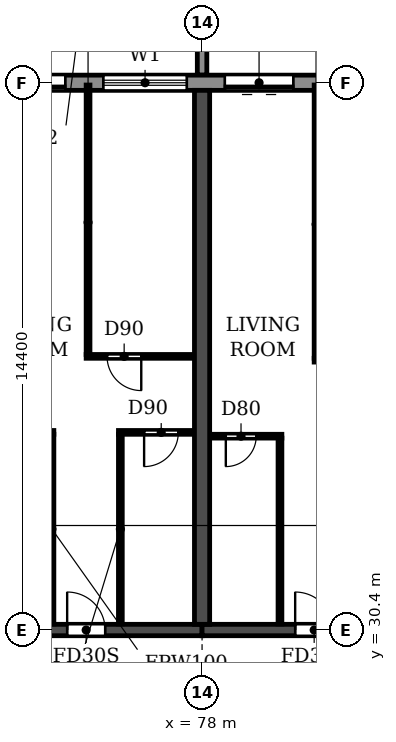
"""IFC4 building model, lengths in metres.
Left out: names, types, materials, properties, quantities, classifications, styles, units other than length and angle.
Written with IfcOpenShell. Run it as: python <this file> out.ifc"""

import sys

from ifc_helpers import new_model, si_unit, direction, frame, frame_2d, origin, place, context, subcontext, project, spatial, polyline, rectangle, outline, extrude, source, transform, mapped, element, fill, save


model = new_model("IFC4")
c1 = context("Model", 3, precision=1e-05, world=origin(), true_north=direction((0.0, 1.0)))
c2 = subcontext(c1, "Body", "Model", "MODEL_VIEW")
j1 = project(units=[si_unit("LENGTHUNIT", "METRE"), si_unit("PLANEANGLEUNIT", "RADIAN")], contexts=[c1])
p1 = place(None, origin())
s1 = spatial("IfcSite", under=j1, at=p1, CompositionType="ELEMENT")
p2 = place(p1, origin())
s2 = spatial("IfcBuilding", under=s1, at=p2, CompositionType="ELEMENT")
p3 = place(p2, frame((0.0, 0.0, 63.0)))
s3 = spatial("IfcBuildingStorey", under=s2, at=p3, CompositionType="ELEMENT", Elevation=63.0)
p4 = place(p3, frame((78.0, 30.55, 0.0), z_axis=(0.0, 0.0, 1.0), x_axis=(0.0, 1.0, 0.0)))
e1 = element("IfcWall", 1, at=p4, inside=s3, PredefinedType="SHEAR", context=c2, shape_type="SweptSolid", body=[
    extrude(rectangle(XDim=14.05, YDim=0.4, at=frame_2d((7.025, 0.0))), origin(), (0.0, 0.0, 1.0), 2.95),
])
p5 = place(p3, frame((72.0, 30.4, 0.0), z_axis=(0.0, 0.0, 1.0), x_axis=(1.0, 0.0, 0.0)))
e2 = element("IfcWall", 2, at=p5, inside=s3, PredefinedType="SHEAR", context=c2, shape_type="SweptSolid", body=[
    extrude(rectangle(XDim=6.0, YDim=0.3, at=frame_2d((3.0, 0.0))), origin(), (0.0, 0.0, 1.0), 2.35),
])
p6 = place(p5, frame((2.45, 0.0, 0.0)))
e3 = element("IfcOpeningElement", 3, at=p6, cuts=e2, PredefinedType="OPENING", context=c2, shape_type="SweptSolid", body=[
    extrude(rectangle(XDim=1.0, YDim=2.1, at=frame_2d((0.5, 1.05))), frame((0.0, 0.16, 0.0), z_axis=(0.0, -1.0, 0.0), x_axis=(1.0, 0.0, 0.0)), (0.0, 0.0, 1.0), 0.32),
])
p7 = place(p3, frame((78.0, 30.4, 0.0), z_axis=(0.0, 0.0, 1.0), x_axis=(1.0, 0.0, 0.0)))
e4 = element("IfcWall", 4, at=p7, inside=s3, PredefinedType="SHEAR", context=c2, shape_type="SweptSolid", body=[
    extrude(rectangle(XDim=6.0, YDim=0.3, at=frame_2d((3.0, 0.0))), origin(), (0.0, 0.0, 1.0), 2.35),
])
p8 = place(p7, frame((2.45, 0.0, 0.0)))
e5 = element("IfcOpeningElement", 5, at=p8, cuts=e4, PredefinedType="OPENING", context=c2, shape_type="SweptSolid", body=[
    extrude(rectangle(XDim=1.0, YDim=2.1, at=frame_2d((0.5, 1.05))), frame((0.0, 0.16, 0.0), z_axis=(0.0, -1.0, 0.0), x_axis=(1.0, 0.0, 0.0)), (0.0, 0.0, 1.0), 0.32),
])
p9 = place(p3, frame((91.317, 44.8, 0.0), z_axis=(0.0, 0.0, 1.0), x_axis=(-1.0, 0.0, 0.0)))
e6 = element("IfcWall", 6, at=p9, inside=s3, PredefinedType="STANDARD", context=c2, shape_type="SweptSolid", body=[
    extrude(rectangle(XDim=80.634, YDim=0.4, at=frame_2d((40.317, 0.0))), origin(), (0.0, 0.0, 1.0), 2.95),
])
p10 = place(p9, frame((76.717, 0.0, 0.9)))
e7 = element("IfcOpeningElement", 7, at=p10, cuts=e6, PredefinedType="OPENING", context=c2, shape_type="SweptSolid", body=[
    extrude(rectangle(XDim=2.2, YDim=1.5, at=frame_2d((1.1, 0.75))), frame((0.0, 0.21, 0.0), z_axis=(0.0, -1.0, 0.0), x_axis=(1.0, 0.0, 0.0)), (0.0, 0.0, 1.0), 0.42),
])
p11 = place(p9, frame((73.917, 0.0, 0.0)))
e8 = element("IfcOpeningElement", 8, at=p11, cuts=e6, PredefinedType="OPENING", context=c2, shape_type="SweptSolid", body=[
    extrude(rectangle(XDim=1.8, YDim=2.4, at=frame_2d((0.9, 1.2))), frame((0.0, 0.21, 0.0), z_axis=(0.0, -1.0, 0.0), x_axis=(1.0, 0.0, 0.0)), (0.0, 0.0, 1.0), 0.42),
])
p12 = place(p9, frame((70.717, 0.0, 0.9)))
e9 = element("IfcOpeningElement", 9, at=p12, cuts=e6, PredefinedType="OPENING", context=c2, shape_type="SweptSolid", body=[
    extrude(rectangle(XDim=2.2, YDim=1.5, at=frame_2d((1.1, 0.75))), frame((0.0, 0.21, 0.0), z_axis=(0.0, -1.0, 0.0), x_axis=(1.0, 0.0, 0.0)), (0.0, 0.0, 1.0), 0.42),
])
p13 = place(p9, frame((67.917, 0.0, 0.0)))
e10 = element("IfcOpeningElement", 10, at=p13, cuts=e6, PredefinedType="OPENING", context=c2, shape_type="SweptSolid", body=[
    extrude(rectangle(XDim=1.8, YDim=2.4, at=frame_2d((0.9, 1.2))), frame((0.0, 0.21, 0.0), z_axis=(0.0, -1.0, 0.0), x_axis=(1.0, 0.0, 0.0)), (0.0, 0.0, 1.0), 0.42),
])
p14 = place(p9, frame((64.717, 0.0, 0.9)))
e11 = element("IfcOpeningElement", 11, at=p14, cuts=e6, PredefinedType="OPENING", context=c2, shape_type="SweptSolid", body=[
    extrude(rectangle(XDim=2.2, YDim=1.5, at=frame_2d((1.1, 0.75))), frame((0.0, 0.21, 0.0), z_axis=(0.0, -1.0, 0.0), x_axis=(1.0, 0.0, 0.0)), (0.0, 0.0, 1.0), 0.42),
])
p15 = place(p9, frame((61.917, 0.0, 0.0)))
e12 = element("IfcOpeningElement", 12, at=p15, cuts=e6, PredefinedType="OPENING", context=c2, shape_type="SweptSolid", body=[
    extrude(rectangle(XDim=1.8, YDim=2.4, at=frame_2d((0.9, 1.2))), frame((0.0, 0.21, 0.0), z_axis=(0.0, -1.0, 0.0), x_axis=(1.0, 0.0, 0.0)), (0.0, 0.0, 1.0), 0.42),
])
p16 = place(p9, frame((58.717, 0.0, 0.9)))
e13 = element("IfcOpeningElement", 13, at=p16, cuts=e6, PredefinedType="OPENING", context=c2, shape_type="SweptSolid", body=[
    extrude(rectangle(XDim=2.2, YDim=1.5, at=frame_2d((1.1, 0.75))), frame((0.0, 0.21, 0.0), z_axis=(0.0, -1.0, 0.0), x_axis=(1.0, 0.0, 0.0)), (0.0, 0.0, 1.0), 0.42),
])
p17 = place(p9, frame((55.717, 0.0, 0.9)))
e14 = element("IfcOpeningElement", 14, at=p17, cuts=e6, PredefinedType="OPENING", context=c2, shape_type="SweptSolid", body=[
    extrude(rectangle(XDim=2.2, YDim=1.5, at=frame_2d((1.1, 0.75))), frame((0.0, 0.21, 0.0), z_axis=(0.0, -1.0, 0.0), x_axis=(1.0, 0.0, 0.0)), (0.0, 0.0, 1.0), 0.42),
])
p18 = place(p9, frame((52.917, 0.0, 0.0)))
e15 = element("IfcOpeningElement", 15, at=p18, cuts=e6, PredefinedType="OPENING", context=c2, shape_type="SweptSolid", body=[
    extrude(rectangle(XDim=1.8, YDim=2.4, at=frame_2d((0.9, 1.2))), frame((0.0, 0.21, 0.0), z_axis=(0.0, -1.0, 0.0), x_axis=(1.0, 0.0, 0.0)), (0.0, 0.0, 1.0), 0.42),
])
p19 = place(p9, frame((49.717, 0.0, 0.9)))
e16 = element("IfcOpeningElement", 16, at=p19, cuts=e6, PredefinedType="OPENING", context=c2, shape_type="SweptSolid", body=[
    extrude(rectangle(XDim=2.2, YDim=1.5, at=frame_2d((1.1, 0.75))), frame((0.0, 0.21, 0.0), z_axis=(0.0, -1.0, 0.0), x_axis=(1.0, 0.0, 0.0)), (0.0, 0.0, 1.0), 0.42),
])
p20 = place(p9, frame((46.917, 0.0, 0.0)))
e17 = element("IfcOpeningElement", 17, at=p20, cuts=e6, PredefinedType="OPENING", context=c2, shape_type="SweptSolid", body=[
    extrude(rectangle(XDim=1.8, YDim=2.4, at=frame_2d((0.9, 1.2))), frame((0.0, 0.21, 0.0), z_axis=(0.0, -1.0, 0.0), x_axis=(1.0, 0.0, 0.0)), (0.0, 0.0, 1.0), 0.42),
])
p21 = place(p9, frame((43.717, 0.0, 0.9)))
e18 = element("IfcOpeningElement", 18, at=p21, cuts=e6, PredefinedType="OPENING", context=c2, shape_type="SweptSolid", body=[
    extrude(rectangle(XDim=2.2, YDim=1.5, at=frame_2d((1.1, 0.75))), frame((0.0, 0.21, 0.0), z_axis=(0.0, -1.0, 0.0), x_axis=(1.0, 0.0, 0.0)), (0.0, 0.0, 1.0), 0.42),
])
p22 = place(p9, frame((40.717, 0.0, 0.9)))
e19 = element("IfcOpeningElement", 19, at=p22, cuts=e6, PredefinedType="OPENING", context=c2, shape_type="SweptSolid", body=[
    extrude(rectangle(XDim=2.2, YDim=1.5, at=frame_2d((1.1, 0.75))), frame((0.0, 0.21, 0.0), z_axis=(0.0, -1.0, 0.0), x_axis=(1.0, 0.0, 0.0)), (0.0, 0.0, 1.0), 0.42),
])
p23 = place(p9, frame((37.717, 0.0, 0.9)))
e20 = element("IfcOpeningElement", 20, at=p23, cuts=e6, PredefinedType="OPENING", context=c2, shape_type="SweptSolid", body=[
    extrude(rectangle(XDim=2.2, YDim=1.5, at=frame_2d((1.1, 0.75))), frame((0.0, 0.21, 0.0), z_axis=(0.0, -1.0, 0.0), x_axis=(1.0, 0.0, 0.0)), (0.0, 0.0, 1.0), 0.42),
])
p24 = place(p9, frame((34.717, 0.0, 0.9)))
e21 = element("IfcOpeningElement", 21, at=p24, cuts=e6, PredefinedType="OPENING", context=c2, shape_type="SweptSolid", body=[
    extrude(rectangle(XDim=2.2, YDim=1.5, at=frame_2d((1.1, 0.75))), frame((0.0, 0.21, 0.0), z_axis=(0.0, -1.0, 0.0), x_axis=(1.0, 0.0, 0.0)), (0.0, 0.0, 1.0), 0.42),
])
p25 = place(p9, frame((31.917, 0.0, 0.0)))
e22 = element("IfcOpeningElement", 22, at=p25, cuts=e6, PredefinedType="OPENING", context=c2, shape_type="SweptSolid", body=[
    extrude(rectangle(XDim=1.8, YDim=2.4, at=frame_2d((0.9, 1.2))), frame((0.0, 0.21, 0.0), z_axis=(0.0, -1.0, 0.0), x_axis=(1.0, 0.0, 0.0)), (0.0, 0.0, 1.0), 0.42),
])
p26 = place(p9, frame((28.917, 0.0, 0.0)))
e23 = element("IfcOpeningElement", 23, at=p26, cuts=e6, PredefinedType="OPENING", context=c2, shape_type="SweptSolid", body=[
    extrude(rectangle(XDim=1.8, YDim=2.4, at=frame_2d((0.9, 1.2))), frame((0.0, 0.21, 0.0), z_axis=(0.0, -1.0, 0.0), x_axis=(1.0, 0.0, 0.0)), (0.0, 0.0, 1.0), 0.42),
])
p27 = place(p9, frame((25.717, 0.0, 0.9)))
e24 = element("IfcOpeningElement", 24, at=p27, cuts=e6, PredefinedType="OPENING", context=c2, shape_type="SweptSolid", body=[
    extrude(rectangle(XDim=2.2, YDim=1.5, at=frame_2d((1.1, 0.75))), frame((0.0, 0.21, 0.0), z_axis=(0.0, -1.0, 0.0), x_axis=(1.0, 0.0, 0.0)), (0.0, 0.0, 1.0), 0.42),
])
p28 = place(p9, frame((22.917, 0.0, 0.0)))
e25 = element("IfcOpeningElement", 25, at=p28, cuts=e6, PredefinedType="OPENING", context=c2, shape_type="SweptSolid", body=[
    extrude(rectangle(XDim=1.8, YDim=2.4, at=frame_2d((0.9, 1.2))), frame((0.0, 0.21, 0.0), z_axis=(0.0, -1.0, 0.0), x_axis=(1.0, 0.0, 0.0)), (0.0, 0.0, 1.0), 0.42),
])
p29 = place(p9, frame((19.717, 0.0, 0.9)))
e26 = element("IfcOpeningElement", 26, at=p29, cuts=e6, PredefinedType="OPENING", context=c2, shape_type="SweptSolid", body=[
    extrude(rectangle(XDim=2.2, YDim=1.5, at=frame_2d((1.1, 0.75))), frame((0.0, 0.21, 0.0), z_axis=(0.0, -1.0, 0.0), x_axis=(1.0, 0.0, 0.0)), (0.0, 0.0, 1.0), 0.42),
])
p30 = place(p9, frame((16.917, 0.0, 0.0)))
e27 = element("IfcOpeningElement", 27, at=p30, cuts=e6, PredefinedType="OPENING", context=c2, shape_type="SweptSolid", body=[
    extrude(rectangle(XDim=1.8, YDim=2.4, at=frame_2d((0.9, 1.2))), frame((0.0, 0.21, 0.0), z_axis=(0.0, -1.0, 0.0), x_axis=(1.0, 0.0, 0.0)), (0.0, 0.0, 1.0), 0.42),
])
p31 = place(p9, frame((13.717, 0.0, 0.9)))
e28 = element("IfcOpeningElement", 28, at=p31, cuts=e6, PredefinedType="OPENING", context=c2, shape_type="SweptSolid", body=[
    extrude(rectangle(XDim=2.2, YDim=1.5, at=frame_2d((1.1, 0.75))), frame((0.0, 0.21, 0.0), z_axis=(0.0, -1.0, 0.0), x_axis=(1.0, 0.0, 0.0)), (0.0, 0.0, 1.0), 0.42),
])
p32 = place(p9, frame((10.917, 0.0, 0.0)))
e29 = element("IfcOpeningElement", 29, at=p32, cuts=e6, PredefinedType="OPENING", context=c2, shape_type="SweptSolid", body=[
    extrude(rectangle(XDim=1.8, YDim=2.4, at=frame_2d((0.9, 1.2))), frame((0.0, 0.21, 0.0), z_axis=(0.0, -1.0, 0.0), x_axis=(1.0, 0.0, 0.0)), (0.0, 0.0, 1.0), 0.42),
])
p33 = place(p9, frame((7.717, 0.0, 0.9)))
e30 = element("IfcOpeningElement", 30, at=p33, cuts=e6, PredefinedType="OPENING", context=c2, shape_type="SweptSolid", body=[
    extrude(rectangle(XDim=2.2, YDim=1.5, at=frame_2d((1.1, 0.75))), frame((0.0, 0.21, 0.0), z_axis=(0.0, -1.0, 0.0), x_axis=(1.0, 0.0, 0.0)), (0.0, 0.0, 1.0), 0.42),
])
p34 = place(p9, frame((4.717, 0.0, 0.9)))
e31 = element("IfcOpeningElement", 31, at=p34, cuts=e6, PredefinedType="OPENING", context=c2, shape_type="SweptSolid", body=[
    extrude(rectangle(XDim=2.2, YDim=1.5, at=frame_2d((1.1, 0.75))), frame((0.0, 0.21, 0.0), z_axis=(0.0, -1.0, 0.0), x_axis=(1.0, 0.0, 0.0)), (0.0, 0.0, 1.0), 0.42),
])
p35 = place(p9, frame((1.717, 0.0, 0.9)))
e32 = element("IfcOpeningElement", 32, at=p35, cuts=e6, PredefinedType="OPENING", context=c2, shape_type="SweptSolid", body=[
    extrude(rectangle(XDim=2.2, YDim=1.5, at=frame_2d((1.1, 0.75))), frame((0.0, 0.21, 0.0), z_axis=(0.0, -1.0, 0.0), x_axis=(1.0, 0.0, 0.0)), (0.0, 0.0, 1.0), 0.42),
])
m1 = source(origin(), c2, "Body", "SweptSolid", [
    extrude(outline(polyline([(0.0, 0.0), (0.25, 0.0), (0.25, 3.1), (0.0, 3.1), (0.0, 0.0)])), origin(), (0.0, 0.0, 1.0), 3.1),
])
p36 = place(p3, frame((77.875, 45.0, 0.0)))
e33 = element("IfcWall", 33, at=p36, inside=s3, PredefinedType="STANDARD", context=c2, shape_type="MappedRepresentation", body=[
    mapped(m1, transform((0.0, 0.0, 0.0))),
])
p37 = place(p3, frame((78.21, 35.5, 0.0), z_axis=(0.0, 0.0, 1.0), x_axis=(1.0, 0.0, 0.0)))
e34 = element("IfcWall", 34, at=p37, inside=s3, PredefinedType="PARTITIONING", context=c2, shape_type="SweptSolid", body=[
    extrude(rectangle(XDim=1.89, YDim=0.1, at=frame_2d((0.945, 0.0))), origin(), (0.0, 0.0, 1.0), 2.95),
])
p38 = place(p37, frame((0.415, 0.0, 0.0)))
e35 = element("IfcOpeningElement", 35, at=p38, cuts=e34, PredefinedType="OPENING", context=c2, shape_type="SweptSolid", body=[
    extrude(rectangle(XDim=0.8, YDim=2.1, at=frame_2d((0.4, 1.05))), frame((0.0, 0.06, 0.0), z_axis=(0.0, -1.0, 0.0), x_axis=(1.0, 0.0, 0.0)), (0.0, 0.0, 1.0), 0.12),
])
p39 = place(p3, frame((72.21, 35.6, 0.0), z_axis=(0.0, 0.0, 1.0), x_axis=(1.0, 0.0, 0.0)))
e36 = element("IfcWall", 36, at=p39, inside=s3, PredefinedType="PARTITIONING", context=c2, shape_type="SweptSolid", body=[
    extrude(rectangle(XDim=1.89, YDim=0.1, at=frame_2d((0.945, 0.0))), origin(), (0.0, 0.0, 1.0), 2.95),
])
p40 = place(p39, frame((0.415, 0.0, 0.0)))
e37 = element("IfcOpeningElement", 37, at=p40, cuts=e36, PredefinedType="OPENING", context=c2, shape_type="SweptSolid", body=[
    extrude(rectangle(XDim=0.8, YDim=2.1, at=frame_2d((0.4, 1.05))), frame((0.0, 0.06, 0.0), z_axis=(0.0, -1.0, 0.0), x_axis=(1.0, 0.0, 0.0)), (0.0, 0.0, 1.0), 0.12),
])
p41 = place(p3, frame((75.8, 35.6, 0.0), z_axis=(0.0, 0.0, 1.0), x_axis=(1.0, 0.0, 0.0)))
e38 = element("IfcWall", 38, at=p41, inside=s3, PredefinedType="PARTITIONING", context=c2, shape_type="SweptSolid", body=[
    extrude(rectangle(XDim=1.99, YDim=0.1, at=frame_2d((0.995, 0.0))), origin(), (0.0, 0.0, 1.0), 2.95),
])
p42 = place(p41, frame((0.675, 0.0, 0.0)))
e39 = element("IfcOpeningElement", 39, at=p42, cuts=e38, PredefinedType="OPENING", context=c2, shape_type="SweptSolid", body=[
    extrude(rectangle(XDim=0.9, YDim=2.1, at=frame_2d((0.45, 1.05))), frame((0.0, 0.06, 0.0), z_axis=(0.0, -1.0, 0.0), x_axis=(1.0, 0.0, 0.0)), (0.0, 0.0, 1.0), 0.12),
])
p43 = place(p3, frame((80.95, 37.5, 0.0), z_axis=(0.0, 0.0, 1.0), x_axis=(1.0, 0.0, 0.0)))
e40 = element("IfcWall", 40, at=p43, inside=s3, PredefinedType="PARTITIONING", context=c2, shape_type="SweptSolid", body=[
    extrude(rectangle(XDim=2.84, YDim=0.1, at=frame_2d((1.42, 0.0))), origin(), (0.0, 0.0, 1.0), 2.95),
])
p44 = place(p43, frame((1.65, 0.0, 0.0)))
e41 = element("IfcOpeningElement", 41, at=p44, cuts=e40, PredefinedType="OPENING", context=c2, shape_type="SweptSolid", body=[
    extrude(rectangle(XDim=0.9, YDim=2.1, at=frame_2d((0.45, 1.05))), frame((0.0, 0.06, 0.0), z_axis=(0.0, -1.0, 0.0), x_axis=(1.0, 0.0, 0.0)), (0.0, 0.0, 1.0), 0.12),
])
p45 = place(p3, frame((74.95, 37.6, 0.0), z_axis=(0.0, 0.0, 1.0), x_axis=(1.0, 0.0, 0.0)))
e42 = element("IfcWall", 42, at=p45, inside=s3, PredefinedType="PARTITIONING", context=c2, shape_type="SweptSolid", body=[
    extrude(rectangle(XDim=2.84, YDim=0.1, at=frame_2d((1.42, 0.0))), origin(), (0.0, 0.0, 1.0), 2.95),
])
p46 = place(p45, frame((0.55, 0.0, 0.0)))
e43 = element("IfcOpeningElement", 43, at=p46, cuts=e42, PredefinedType="OPENING", context=c2, shape_type="SweptSolid", body=[
    extrude(rectangle(XDim=0.9, YDim=2.1, at=frame_2d((0.45, 1.05))), frame((0.0, 0.06, 0.0), z_axis=(0.0, -1.0, 0.0), x_axis=(1.0, 0.0, 0.0)), (0.0, 0.0, 1.0), 0.12),
])
p47 = place(p3, frame((74.05, 30.56, 0.0), z_axis=(0.0, 0.0, 1.0), x_axis=(0.0, 1.0, 0.0)))
e44 = element("IfcWall", 44, at=p47, inside=s3, PredefinedType="PARTITIONING", context=c2, shape_type="SweptSolid", body=[
    extrude(rectangle(XDim=4.99, YDim=0.1, at=frame_2d((2.495, 0.0))), origin(), (0.0, 0.0, 1.0), 2.95),
])
p48 = place(p3, frame((75.0, 37.65, 0.0), z_axis=(0.0, 0.0, 1.0), x_axis=(0.0, 1.0, 0.0)))
e45 = element("IfcWall", 45, at=p48, inside=s3, PredefinedType="PARTITIONING", context=c2, shape_type="SweptSolid", body=[
    extrude(rectangle(XDim=7.09, YDim=0.1, at=frame_2d((3.545, 0.0))), origin(), (0.0, 0.0, 1.0), 2.95),
])
p49 = place(p3, frame((75.85, 30.56, 0.0), z_axis=(0.0, 0.0, 1.0), x_axis=(0.0, 1.0, 0.0)))
e46 = element("IfcWall", 46, at=p49, inside=s3, PredefinedType="PARTITIONING", context=c2, shape_type="SweptSolid", body=[
    extrude(rectangle(XDim=4.99, YDim=0.1, at=frame_2d((2.495, 0.0))), origin(), (0.0, 0.0, 1.0), 2.95),
])
p50 = place(p3, frame((80.05, 30.56, 0.0), z_axis=(0.0, 0.0, 1.0), x_axis=(0.0, 1.0, 0.0)))
e47 = element("IfcWall", 47, at=p50, inside=s3, PredefinedType="PARTITIONING", context=c2, shape_type="SweptSolid", body=[
    extrude(rectangle(XDim=4.89, YDim=0.1, at=frame_2d((2.445, 0.0))), origin(), (0.0, 0.0, 1.0), 2.95),
])
p51 = place(p3, frame((81.0, 37.55, 0.0), z_axis=(0.0, 0.0, 1.0), x_axis=(0.0, 1.0, 0.0)))
e48 = element("IfcWall", 48, at=p51, inside=s3, PredefinedType="PARTITIONING", context=c2, shape_type="SweptSolid", body=[
    extrude(rectangle(XDim=7.19, YDim=0.1, at=frame_2d((3.595, 0.0))), origin(), (0.0, 0.0, 1.0), 2.95),
])
p52 = place(p30, origin())
e49 = element("IfcDoor", 49, at=p52, inside=s3, OperationType="DOUBLE_DOOR_SLIDING", PredefinedType="DOOR", context=c2, shape_type="SweptSolid", body=[
    extrude(rectangle(XDim=1.8, YDim=2.4, at=frame_2d((0.9, 1.2))), frame((0.0, 0.025, 0.0), z_axis=(0.0, -1.0, 0.0), x_axis=(1.0, 0.0, 0.0)), (0.0, 0.0, 1.0), 0.05),
])
fill(e27, e49)
p53 = place(p31, origin())
e50 = element("IfcWindow", 50, at=p53, inside=s3, PartitioningType="DOUBLE_PANEL_HORIZONTAL", PredefinedType="WINDOW", context=c2, shape_type="SweptSolid", body=[
    extrude(rectangle(XDim=2.2, YDim=1.5, at=frame_2d((1.1, 0.75))), frame((0.0, 0.03, 0.0), z_axis=(0.0, -1.0, 0.0), x_axis=(1.0, 0.0, 0.0)), (0.0, 0.0, 1.0), 0.06),
])
fill(e28, e50)
p54 = place(p32, origin())
e51 = element("IfcDoor", 51, at=p54, inside=s3, OperationType="DOUBLE_DOOR_SLIDING", PredefinedType="DOOR", context=c2, shape_type="SweptSolid", body=[
    extrude(rectangle(XDim=1.8, YDim=2.4, at=frame_2d((0.9, 1.2))), frame((0.0, 0.025, 0.0), z_axis=(0.0, -1.0, 0.0), x_axis=(1.0, 0.0, 0.0)), (0.0, 0.0, 1.0), 0.05),
])
fill(e29, e51)
p55 = place(p6, origin())
e52 = element("IfcDoor", 52, at=p55, inside=s3, OperationType="SINGLE_SWING_LEFT", PredefinedType="DOOR", context=c2, shape_type="SweptSolid", body=[
    extrude(rectangle(XDim=1.0, YDim=2.1, at=frame_2d((0.5, 1.05))), frame((0.0, 0.025, 0.0), z_axis=(0.0, -1.0, 0.0), x_axis=(1.0, 0.0, 0.0)), (0.0, 0.0, 1.0), 0.05),
])
fill(e3, e52)
p56 = place(p46, frame((0.9, 0.0, 0.0), z_axis=(0.0, 0.0, 1.0), x_axis=(-1.0, 0.0, 0.0)))
e53 = element("IfcDoor", 53, at=p56, inside=s3, OperationType="SINGLE_SWING_LEFT", PredefinedType="DOOR", context=c2, shape_type="SweptSolid", body=[
    extrude(rectangle(XDim=0.9, YDim=2.1, at=frame_2d((0.45, 1.05))), frame((0.0, 0.025, 0.0), z_axis=(0.0, -1.0, 0.0), x_axis=(1.0, 0.0, 0.0)), (0.0, 0.0, 1.0), 0.05),
])
fill(e43, e53)
p57 = place(p42, frame((0.9, 0.0, 0.0), z_axis=(0.0, 0.0, 1.0), x_axis=(-1.0, 0.0, 0.0)))
e54 = element("IfcDoor", 54, at=p57, inside=s3, OperationType="SINGLE_SWING_RIGHT", PredefinedType="DOOR", context=c2, shape_type="SweptSolid", body=[
    extrude(rectangle(XDim=0.9, YDim=2.1, at=frame_2d((0.45, 1.05))), frame((0.0, 0.025, 0.0), z_axis=(0.0, -1.0, 0.0), x_axis=(1.0, 0.0, 0.0)), (0.0, 0.0, 1.0), 0.05),
])
fill(e39, e54)
p58 = place(p38, frame((0.8, 0.0, 0.0), z_axis=(0.0, 0.0, 1.0), x_axis=(-1.0, 0.0, 0.0)))
e55 = element("IfcDoor", 55, at=p58, inside=s3, OperationType="SINGLE_SWING_RIGHT", PredefinedType="DOOR", context=c2, shape_type="SweptSolid", body=[
    extrude(rectangle(XDim=0.8, YDim=2.1, at=frame_2d((0.4, 1.05))), frame((0.0, 0.025, 0.0), z_axis=(0.0, -1.0, 0.0), x_axis=(1.0, 0.0, 0.0)), (0.0, 0.0, 1.0), 0.05),
])
fill(e35, e55)
p59 = place(p8, origin())
e56 = element("IfcDoor", 56, at=p59, inside=s3, OperationType="SINGLE_SWING_LEFT", PredefinedType="DOOR", context=c2, shape_type="SweptSolid", body=[
    extrude(rectangle(XDim=1.0, YDim=2.1, at=frame_2d((0.5, 1.05))), frame((0.0, 0.025, 0.0), z_axis=(0.0, -1.0, 0.0), x_axis=(1.0, 0.0, 0.0)), (0.0, 0.0, 1.0), 0.05),
])
fill(e5, e56)
save(model, sys.argv[1])
